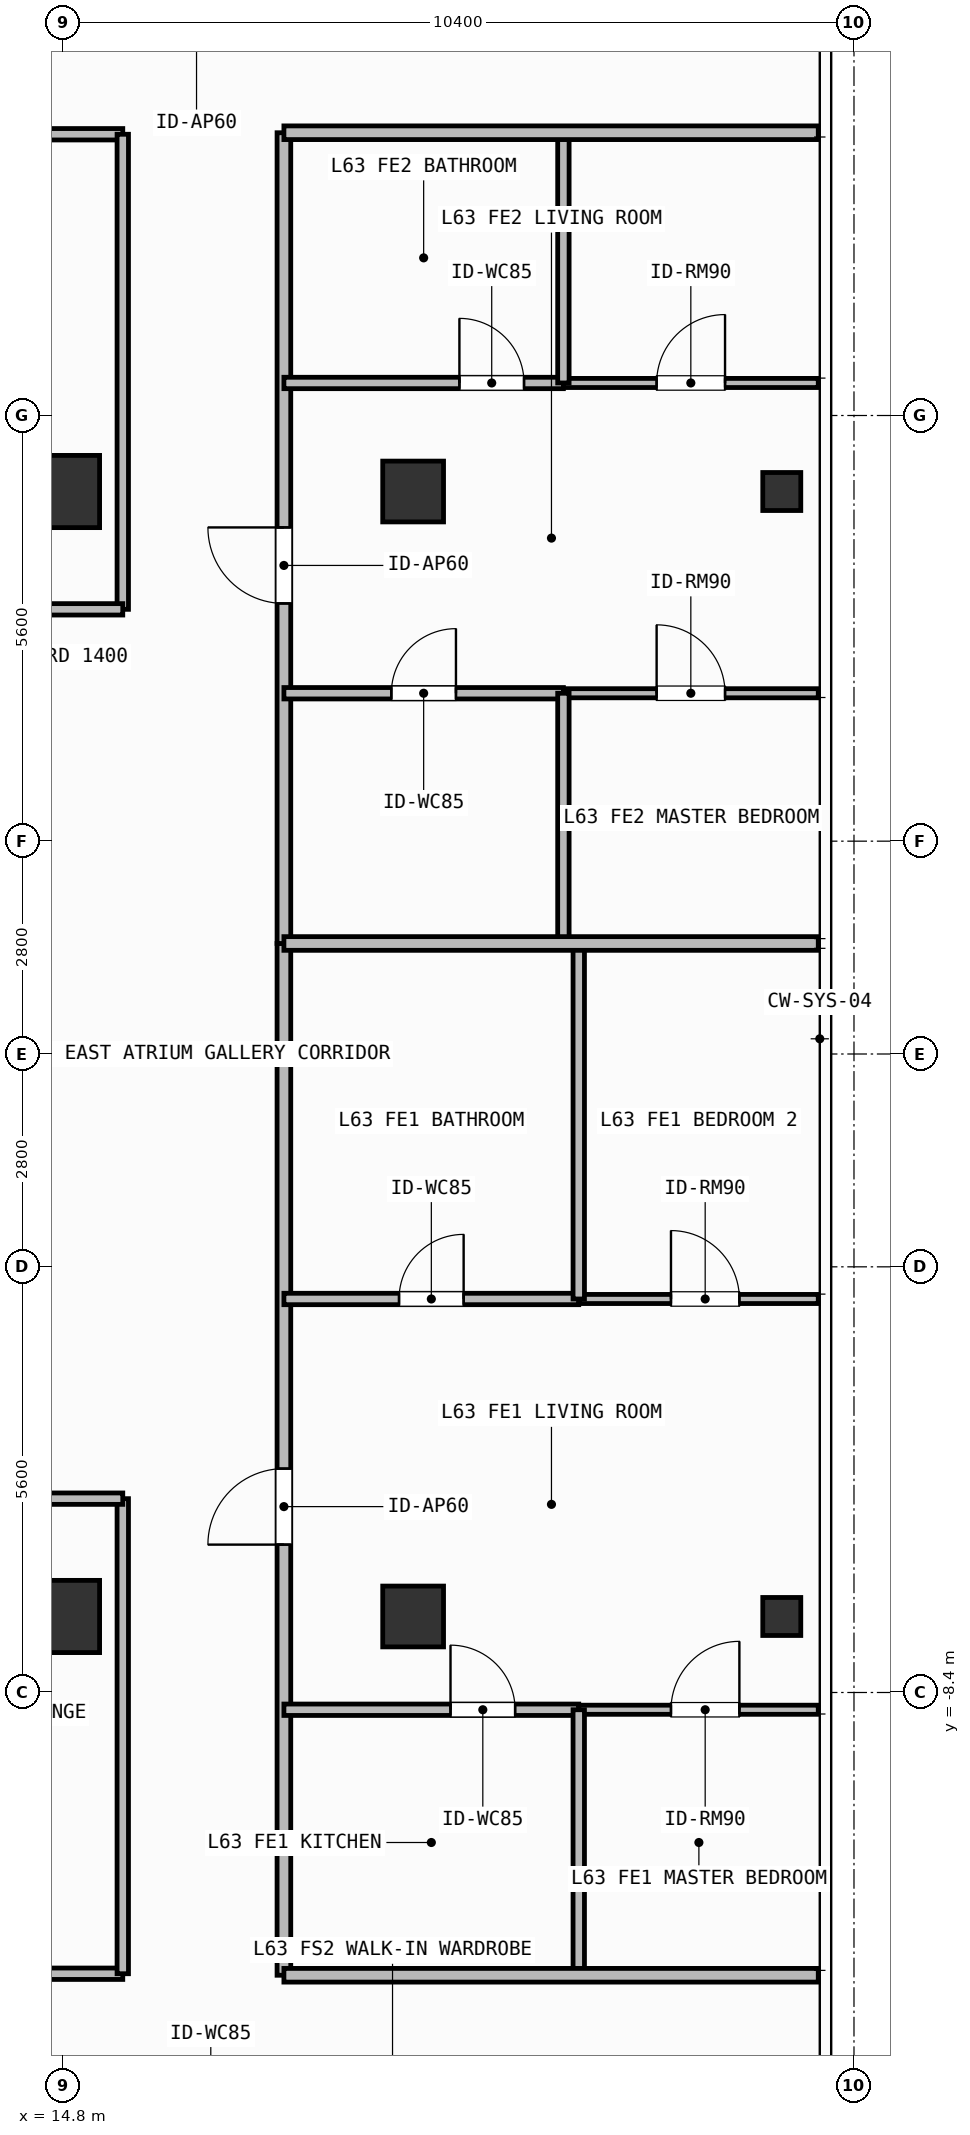
"""IFC4 building model, lengths in metres.
Left out: names, types, materials, properties, quantities, classifications, styles, units other than length and angle.
Written with IfcOpenShell. Run it as: python <this file> out.ifc"""

import sys

from ifc_helpers import new_model, si_unit, direction, frame, frame_2d, origin, origin_2d, place, context, subcontext, project, spatial, rectangle, hollow_rectangle, extrude, element, fill, save


model = new_model("IFC4")
c1 = context("Model", 3, precision=1e-05, world=origin(), true_north=direction((0.0, 1.0)))
c2 = subcontext(c1, "Body", "Model", "MODEL_VIEW")
j1 = project(units=[si_unit("LENGTHUNIT", "METRE"), si_unit("PLANEANGLEUNIT", "RADIAN")], contexts=[c1])
p1 = place(None, origin())
s1 = spatial("IfcSite", under=j1, at=p1, CompositionType="ELEMENT")
p2 = place(p1, origin())
s2 = spatial("IfcBuilding", under=s1, at=p2, CompositionType="ELEMENT")
p3 = place(p2, frame((0.0, 0.0, 258.6)))
s3 = spatial("IfcBuildingStorey", under=s2, at=p3, CompositionType="ELEMENT", Elevation=258.6)
for number, where, z_axis, x_axis in (
    (1, (14.8, -7.4, 0.0), (0.0, 0.0, 1.0), (1.0, 0.0, 0.0)),
    (2, (14.8, 7.4, 0.0), (0.0, 0.0, 1.0), (1.0, 0.0, 0.0)),
):
    element("IfcColumn", number, at=place(p3, frame(where, z_axis=z_axis, x_axis=x_axis)), inside=s3, PredefinedType="COLUMN", context=c2, shape_type="SweptSolid", body=[
        extrude(rectangle(XDim=0.95, YDim=0.95, at=origin_2d()), origin(), (0.0, 0.0, 1.0), 3.9),
    ])
for number, where, z_axis, x_axis in (
    (3, (19.4, -7.4, 0.0), (0.0, 0.0, 1.0), (1.0, 0.0, 0.0)),
    (4, (19.4, 7.4, 0.0), (0.0, 0.0, 1.0), (1.0, 0.0, 0.0)),
):
    element("IfcColumn", number, at=place(p3, frame(where, z_axis=z_axis, x_axis=x_axis)), inside=s3, PredefinedType="COLUMN", context=c2, shape_type="SweptSolid", body=[
        extrude(hollow_rectangle(XDim=0.8, YDim=0.8, WallThickness=0.036, at=origin_2d()), origin(), (0.0, 0.0, 1.0), 3.9),
    ])
for number, where, z_axis, x_axis in (
    (5, (24.25, -7.4, 0.0), (0.0, 0.0, 1.0), (1.0, 0.0, 0.0)),
    (6, (24.25, 7.4, 0.0), (0.0, 0.0, 1.0), (1.0, 0.0, 0.0)),
):
    element("IfcColumn", number, at=place(p3, frame(where, z_axis=z_axis, x_axis=x_axis)), inside=s3, PredefinedType="COLUMN", context=c2, shape_type="SweptSolid", body=[
        extrude(hollow_rectangle(XDim=0.5, YDim=0.5, WallThickness=0.025, at=origin_2d()), origin(), (0.0, 0.0, 1.0), 3.9),
    ])
p4 = place(p3, frame((10.1, -12.1, 0.0), z_axis=(0.0, 0.0, 1.0), x_axis=(1.0, 0.0, 0.0)))
e7 = element("IfcWall", 7, at=p4, inside=s3, PredefinedType="PARTITIONING", context=c2, shape_type="SweptSolid", body=[
    extrude(rectangle(XDim=5.48, YDim=0.15, at=frame_2d((2.74, 0.0))), origin(), (0.0, 0.0, 1.0), 3.68),
])
p5 = place(p4, frame((2.29, 0.0, 0.0)))
e8 = element("IfcOpeningElement", 8, at=p5, cuts=e7, PredefinedType="OPENING", context=c2, shape_type="SweptSolid", body=[
    extrude(rectangle(XDim=0.9, YDim=2.1, at=frame_2d((0.45, 1.05))), frame((0.0, 0.085, 0.0), z_axis=(0.0, -1.0, 0.0), x_axis=(1.0, 0.0, 0.0)), (0.0, 0.0, 1.0), 0.17),
])
p6 = place(p3, frame((8.36, 12.1, 0.0), z_axis=(0.0, 0.0, 1.0), x_axis=(1.0, 0.0, 0.0)))
e9 = element("IfcWall", 9, at=p6, inside=s3, PredefinedType="PARTITIONING", context=c2, shape_type="SweptSolid", body=[
    extrude(rectangle(XDim=7.22, YDim=0.15, at=frame_2d((3.61, 0.0))), origin(), (0.0, 0.0, 1.0), 3.68),
])
p7 = place(p6, frame((3.513, 0.0, 0.0)))
e10 = element("IfcOpeningElement", 10, at=p7, cuts=e9, PredefinedType="OPENING", context=c2, shape_type="SweptSolid", body=[
    extrude(rectangle(XDim=0.9, YDim=2.1, at=frame_2d((0.45, 1.05))), frame((0.0, 0.085, 0.0), z_axis=(0.0, -1.0, 0.0), x_axis=(1.0, 0.0, 0.0)), (0.0, 0.0, 1.0), 0.17),
])
p8 = place(p3, frame((17.7, -12.12, 0.0), z_axis=(0.0, 0.0, 1.0), x_axis=(0.0, 1.0, 0.0)))
e11 = element("IfcWall", 11, at=p8, inside=s3, PredefinedType="PARTITIONING", context=c2, shape_type="SweptSolid", body=[
    extrude(rectangle(XDim=13.574, YDim=0.18, at=frame_2d((6.787, 0.0))), origin(), (0.0, 0.0, 1.0), 3.68),
])
p9 = place(p8, frame((5.665, 0.0, 0.0)))
e12 = element("IfcOpeningElement", 12, at=p9, cuts=e11, PredefinedType="OPENING", context=c2, shape_type="SweptSolid", body=[
    extrude(rectangle(XDim=1.0, YDim=2.2, at=frame_2d((0.5, 1.1))), frame((0.0, 0.1, 0.0), z_axis=(0.0, -1.0, 0.0), x_axis=(1.0, 0.0, 0.0)), (0.0, 0.0, 1.0), 0.2),
])
p10 = place(p3, frame((17.7, -3.223, 0.0), z_axis=(0.0, 0.0, 1.0), x_axis=(1.0, 0.0, 0.0)))
e13 = element("IfcWall", 13, at=p10, inside=s3, PredefinedType="PARTITIONING", context=c2, shape_type="SweptSolid", body=[
    extrude(rectangle(XDim=3.879, YDim=0.15, at=frame_2d((1.939, 0.0))), origin(), (0.0, 0.0, 1.0), 3.68),
])
p11 = place(p10, frame((1.514, 0.0, 0.0)))
e14 = element("IfcOpeningElement", 14, at=p11, cuts=e13, PredefinedType="OPENING", context=c2, shape_type="SweptSolid", body=[
    extrude(rectangle(XDim=0.85, YDim=2.1, at=frame_2d((0.425, 1.05))), frame((0.0, 0.085, 0.0), z_axis=(0.0, -1.0, 0.0), x_axis=(1.0, 0.0, 0.0)), (0.0, 0.0, 1.0), 0.17),
])
p12 = place(p3, frame((17.7, -8.627, 0.0), z_axis=(0.0, 0.0, 1.0), x_axis=(1.0, 0.0, 0.0)))
e15 = element("IfcWall", 15, at=p12, inside=s3, PredefinedType="PARTITIONING", context=c2, shape_type="SweptSolid", body=[
    extrude(rectangle(XDim=3.879, YDim=0.15, at=frame_2d((1.939, 0.0))), origin(), (0.0, 0.0, 1.0), 3.68),
])
p13 = place(p12, frame((2.192, 0.0, 0.0)))
e16 = element("IfcOpeningElement", 16, at=p13, cuts=e15, PredefinedType="OPENING", context=c2, shape_type="SweptSolid", body=[
    extrude(rectangle(XDim=0.85, YDim=2.1, at=frame_2d((0.425, 1.05))), frame((0.0, 0.085, 0.0), z_axis=(0.0, -1.0, 0.0), x_axis=(1.0, 0.0, 0.0)), (0.0, 0.0, 1.0), 0.17),
])
p14 = place(p3, frame((21.579, -8.627, 0.0), z_axis=(0.0, 0.0, 1.0), x_axis=(1.0, 0.0, 0.0)))
e17 = element("IfcWall", 17, at=p14, inside=s3, PredefinedType="PARTITIONING", context=c2, shape_type="SweptSolid", body=[
    extrude(rectangle(XDim=3.151, YDim=0.12, at=frame_2d((1.575, 0.0))), origin(), (0.0, 0.0, 1.0), 3.68),
])
p15 = place(p14, frame((1.213, 0.0, 0.0)))
e18 = element("IfcOpeningElement", 18, at=p15, cuts=e17, PredefinedType="OPENING", context=c2, shape_type="SweptSolid", body=[
    extrude(rectangle(XDim=0.9, YDim=2.1, at=frame_2d((0.45, 1.05))), frame((0.0, 0.07, 0.0), z_axis=(0.0, -1.0, 0.0), x_axis=(1.0, 0.0, 0.0)), (0.0, 0.0, 1.0), 0.14),
])
p16 = place(p3, frame((21.579, -3.223, 0.0), z_axis=(0.0, 0.0, 1.0), x_axis=(1.0, 0.0, 0.0)))
e19 = element("IfcWall", 19, at=p16, inside=s3, PredefinedType="PARTITIONING", context=c2, shape_type="SweptSolid", body=[
    extrude(rectangle(XDim=3.151, YDim=0.12, at=frame_2d((1.575, 0.0))), origin(), (0.0, 0.0, 1.0), 3.68),
])
p17 = place(p16, frame((1.213, 0.0, 0.0)))
e20 = element("IfcOpeningElement", 20, at=p17, cuts=e19, PredefinedType="OPENING", context=c2, shape_type="SweptSolid", body=[
    extrude(rectangle(XDim=0.9, YDim=2.1, at=frame_2d((0.45, 1.05))), frame((0.0, 0.07, 0.0), z_axis=(0.0, -1.0, 0.0), x_axis=(1.0, 0.0, 0.0)), (0.0, 0.0, 1.0), 0.14),
])
p18 = place(p3, frame((17.7, 1.454, 0.0), z_axis=(0.0, 0.0, 1.0), x_axis=(0.0, 1.0, 0.0)))
e21 = element("IfcWall", 21, at=p18, inside=s3, PredefinedType="PARTITIONING", context=c2, shape_type="SweptSolid", body=[
    extrude(rectangle(XDim=10.666, YDim=0.18, at=frame_2d((5.333, 0.0))), origin(), (0.0, 0.0, 1.0), 3.68),
])
p19 = place(p18, frame((4.473, 0.0, 0.0)))
e22 = element("IfcOpeningElement", 22, at=p19, cuts=e21, PredefinedType="OPENING", context=c2, shape_type="SweptSolid", body=[
    extrude(rectangle(XDim=1.0, YDim=2.2, at=frame_2d((0.5, 1.1))), frame((0.0, 0.1, 0.0), z_axis=(0.0, -1.0, 0.0), x_axis=(1.0, 0.0, 0.0)), (0.0, 0.0, 1.0), 0.2),
])
p20 = place(p3, frame((17.7, 8.828, 0.0), z_axis=(0.0, 0.0, 1.0), x_axis=(1.0, 0.0, 0.0)))
e23 = element("IfcWall", 23, at=p20, inside=s3, PredefinedType="PARTITIONING", context=c2, shape_type="SweptSolid", body=[
    extrude(rectangle(XDim=3.677, YDim=0.15, at=frame_2d((1.838, 0.0))), origin(), (0.0, 0.0, 1.0), 3.68),
])
p21 = place(p20, frame((2.309, 0.0, 0.0)))
e24 = element("IfcOpeningElement", 24, at=p21, cuts=e23, PredefinedType="OPENING", context=c2, shape_type="SweptSolid", body=[
    extrude(rectangle(XDim=0.85, YDim=2.1, at=frame_2d((0.425, 1.05))), frame((0.0, 0.085, 0.0), z_axis=(0.0, -1.0, 0.0), x_axis=(1.0, 0.0, 0.0)), (0.0, 0.0, 1.0), 0.17),
])
p22 = place(p3, frame((17.7, 4.746, 0.0), z_axis=(0.0, 0.0, 1.0), x_axis=(1.0, 0.0, 0.0)))
e25 = element("IfcWall", 25, at=p22, inside=s3, PredefinedType="PARTITIONING", context=c2, shape_type="SweptSolid", body=[
    extrude(rectangle(XDim=3.677, YDim=0.15, at=frame_2d((1.838, 0.0))), origin(), (0.0, 0.0, 1.0), 3.68),
])
p23 = place(p22, frame((1.414, 0.0, 0.0)))
e26 = element("IfcOpeningElement", 26, at=p23, cuts=e25, PredefinedType="OPENING", context=c2, shape_type="SweptSolid", body=[
    extrude(rectangle(XDim=0.85, YDim=2.1, at=frame_2d((0.425, 1.05))), frame((0.0, 0.085, 0.0), z_axis=(0.0, -1.0, 0.0), x_axis=(1.0, 0.0, 0.0)), (0.0, 0.0, 1.0), 0.17),
])
p24 = place(p3, frame((21.377, 4.746, 0.0), z_axis=(0.0, 0.0, 1.0), x_axis=(1.0, 0.0, 0.0)))
e27 = element("IfcWall", 27, at=p24, inside=s3, PredefinedType="PARTITIONING", context=c2, shape_type="SweptSolid", body=[
    extrude(rectangle(XDim=3.353, YDim=0.12, at=frame_2d((1.677, 0.0))), origin(), (0.0, 0.0, 1.0), 3.68),
])
p25 = place(p24, frame((1.227, 0.0, 0.0)))
e28 = element("IfcOpeningElement", 28, at=p25, cuts=e27, PredefinedType="OPENING", context=c2, shape_type="SweptSolid", body=[
    extrude(rectangle(XDim=0.9, YDim=2.1, at=frame_2d((0.45, 1.05))), frame((0.0, 0.07, 0.0), z_axis=(0.0, -1.0, 0.0), x_axis=(1.0, 0.0, 0.0)), (0.0, 0.0, 1.0), 0.14),
])
p26 = place(p3, frame((21.377, 8.828, 0.0), z_axis=(0.0, 0.0, 1.0), x_axis=(1.0, 0.0, 0.0)))
e29 = element("IfcWall", 29, at=p26, inside=s3, PredefinedType="PARTITIONING", context=c2, shape_type="SweptSolid", body=[
    extrude(rectangle(XDim=3.353, YDim=0.12, at=frame_2d((1.677, 0.0))), origin(), (0.0, 0.0, 1.0), 3.68),
])
p27 = place(p26, frame((1.227, 0.0, 0.0)))
e30 = element("IfcOpeningElement", 30, at=p27, cuts=e29, PredefinedType="OPENING", context=c2, shape_type="SweptSolid", body=[
    extrude(rectangle(XDim=0.9, YDim=2.1, at=frame_2d((0.45, 1.05))), frame((0.0, 0.07, 0.0), z_axis=(0.0, -1.0, 0.0), x_axis=(1.0, 0.0, 0.0)), (0.0, 0.0, 1.0), 0.14),
])
p28 = place(p3, frame((15.58, -12.1, 0.0), z_axis=(0.0, 0.0, 1.0), x_axis=(0.0, 1.0, 0.0)))
e31 = element("IfcWall", 31, at=p28, inside=s3, PredefinedType="PARTITIONING", context=c2, shape_type="SweptSolid", body=[
    extrude(rectangle(XDim=6.25, YDim=0.15, at=frame_2d((3.125, 0.0))), origin(), (0.0, 0.0, 1.0), 3.68),
])
p29 = place(p3, frame((8.96, -5.85, 0.0), z_axis=(0.0, 0.0, 1.0), x_axis=(1.0, 0.0, 0.0)))
e32 = element("IfcWall", 32, at=p29, inside=s3, PredefinedType="PARTITIONING", context=c2, shape_type="SweptSolid", body=[
    extrude(rectangle(XDim=6.62, YDim=0.15, at=frame_2d((3.31, 0.0))), origin(), (0.0, 0.0, 1.0), 3.68),
])
p30 = place(p3, frame((15.58, 5.85, 0.0), z_axis=(0.0, 0.0, 1.0), x_axis=(0.0, 1.0, 0.0)))
e33 = element("IfcWall", 33, at=p30, inside=s3, PredefinedType="PARTITIONING", context=c2, shape_type="SweptSolid", body=[
    extrude(rectangle(XDim=6.25, YDim=0.15, at=frame_2d((3.125, 0.0))), origin(), (0.0, 0.0, 1.0), 3.68),
])
p31 = place(p3, frame((8.96, 5.85, 0.0), z_axis=(0.0, 0.0, 1.0), x_axis=(1.0, 0.0, 0.0)))
e34 = element("IfcWall", 34, at=p31, inside=s3, PredefinedType="PARTITIONING", context=c2, shape_type="SweptSolid", body=[
    extrude(rectangle(XDim=6.62, YDim=0.15, at=frame_2d((3.31, 0.0))), origin(), (0.0, 0.0, 1.0), 3.68),
])
p32 = place(p3, frame((21.579, -12.12, 0.0), z_axis=(0.0, 0.0, 1.0), x_axis=(0.0, 1.0, 0.0)))
e35 = element("IfcWall", 35, at=p32, inside=s3, PredefinedType="PARTITIONING", context=c2, shape_type="SweptSolid", body=[
    extrude(rectangle(XDim=3.493, YDim=0.15, at=frame_2d((1.747, 0.0))), origin(), (0.0, 0.0, 1.0), 3.68),
])
p33 = place(p3, frame((21.579, -3.223, 0.0), z_axis=(0.0, 0.0, 1.0), x_axis=(0.0, 1.0, 0.0)))
e36 = element("IfcWall", 36, at=p33, inside=s3, PredefinedType="PARTITIONING", context=c2, shape_type="SweptSolid", body=[
    extrude(rectangle(XDim=4.677, YDim=0.15, at=frame_2d((2.338, 0.0))), origin(), (0.0, 0.0, 1.0), 3.68),
])
p34 = place(p3, frame((21.377, 1.454, 0.0), z_axis=(0.0, 0.0, 1.0), x_axis=(0.0, 1.0, 0.0)))
e37 = element("IfcWall", 37, at=p34, inside=s3, PredefinedType="PARTITIONING", context=c2, shape_type="SweptSolid", body=[
    extrude(rectangle(XDim=3.292, YDim=0.15, at=frame_2d((1.646, 0.0))), origin(), (0.0, 0.0, 1.0), 3.68),
])
p35 = place(p3, frame((21.377, 8.828, 0.0), z_axis=(0.0, 0.0, 1.0), x_axis=(0.0, 1.0, 0.0)))
e38 = element("IfcWall", 38, at=p35, inside=s3, PredefinedType="PARTITIONING", context=c2, shape_type="SweptSolid", body=[
    extrude(rectangle(XDim=3.292, YDim=0.15, at=frame_2d((1.646, 0.0))), origin(), (0.0, 0.0, 1.0), 3.68),
])
for number, where, z_axis, x_axis in (
    (39, (17.7, 1.454, 0.0), (0.0, 0.0, 1.0), (1.0, 0.0, 0.0)),
    (40, (17.7, -12.12, 0.0), (0.0, 0.0, 1.0), (1.0, 0.0, 0.0)),
    (41, (17.7, 12.12, 0.0), (0.0, 0.0, 1.0), (1.0, 0.0, 0.0)),
):
    element("IfcWall", number, at=place(p3, frame(where, z_axis=z_axis, x_axis=x_axis)), inside=s3, PredefinedType="PARTITIONING", context=c2, shape_type="SweptSolid", body=[
        extrude(rectangle(XDim=7.03, YDim=0.18, at=frame_2d((3.515, 0.0))), origin(), (0.0, 0.0, 1.0), 3.68),
    ])
p36 = place(p9, origin())
e42 = element("IfcDoor", 42, at=p36, inside=s3, OperationType="SINGLE_SWING_LEFT", PredefinedType="DOOR", context=c2, shape_type="SweptSolid", body=[
    extrude(rectangle(XDim=1.0, YDim=2.2, at=frame_2d((0.5, 1.1))), frame((0.0, 0.025, 0.0), z_axis=(0.0, -1.0, 0.0), x_axis=(1.0, 0.0, 0.0)), (0.0, 0.0, 1.0), 0.05),
])
fill(e12, e42)
p37 = place(p11, origin())
e43 = element("IfcDoor", 43, at=p37, inside=s3, OperationType="SINGLE_SWING_RIGHT", PredefinedType="DOOR", context=c2, shape_type="SweptSolid", body=[
    extrude(rectangle(XDim=0.85, YDim=2.1, at=frame_2d((0.425, 1.05))), frame((0.0, 0.025, 0.0), z_axis=(0.0, -1.0, 0.0), x_axis=(1.0, 0.0, 0.0)), (0.0, 0.0, 1.0), 0.05),
])
fill(e14, e43)
p38 = place(p13, origin())
e44 = element("IfcDoor", 44, at=p38, inside=s3, OperationType="SINGLE_SWING_LEFT", PredefinedType="DOOR", context=c2, shape_type="SweptSolid", body=[
    extrude(rectangle(XDim=0.85, YDim=2.1, at=frame_2d((0.425, 1.05))), frame((0.0, 0.025, 0.0), z_axis=(0.0, -1.0, 0.0), x_axis=(1.0, 0.0, 0.0)), (0.0, 0.0, 1.0), 0.05),
])
fill(e16, e44)
p39 = place(p15, origin())
e45 = element("IfcDoor", 45, at=p39, inside=s3, OperationType="SINGLE_SWING_RIGHT", PredefinedType="DOOR", context=c2, shape_type="SweptSolid", body=[
    extrude(rectangle(XDim=0.9, YDim=2.1, at=frame_2d((0.45, 1.05))), frame((0.0, 0.025, 0.0), z_axis=(0.0, -1.0, 0.0), x_axis=(1.0, 0.0, 0.0)), (0.0, 0.0, 1.0), 0.05),
])
fill(e18, e45)
p40 = place(p17, origin())
e46 = element("IfcDoor", 46, at=p40, inside=s3, OperationType="SINGLE_SWING_LEFT", PredefinedType="DOOR", context=c2, shape_type="SweptSolid", body=[
    extrude(rectangle(XDim=0.9, YDim=2.1, at=frame_2d((0.45, 1.05))), frame((0.0, 0.025, 0.0), z_axis=(0.0, -1.0, 0.0), x_axis=(1.0, 0.0, 0.0)), (0.0, 0.0, 1.0), 0.05),
])
fill(e20, e46)
p41 = place(p19, origin())
e47 = element("IfcDoor", 47, at=p41, inside=s3, OperationType="SINGLE_SWING_RIGHT", PredefinedType="DOOR", context=c2, shape_type="SweptSolid", body=[
    extrude(rectangle(XDim=1.0, YDim=2.2, at=frame_2d((0.5, 1.1))), frame((0.0, 0.025, 0.0), z_axis=(0.0, -1.0, 0.0), x_axis=(1.0, 0.0, 0.0)), (0.0, 0.0, 1.0), 0.05),
])
fill(e22, e47)
p42 = place(p21, origin())
e48 = element("IfcDoor", 48, at=p42, inside=s3, OperationType="SINGLE_SWING_LEFT", PredefinedType="DOOR", context=c2, shape_type="SweptSolid", body=[
    extrude(rectangle(XDim=0.85, YDim=2.1, at=frame_2d((0.425, 1.05))), frame((0.0, 0.025, 0.0), z_axis=(0.0, -1.0, 0.0), x_axis=(1.0, 0.0, 0.0)), (0.0, 0.0, 1.0), 0.05),
])
fill(e24, e48)
p43 = place(p23, origin())
e49 = element("IfcDoor", 49, at=p43, inside=s3, OperationType="SINGLE_SWING_RIGHT", PredefinedType="DOOR", context=c2, shape_type="SweptSolid", body=[
    extrude(rectangle(XDim=0.85, YDim=2.1, at=frame_2d((0.425, 1.05))), frame((0.0, 0.025, 0.0), z_axis=(0.0, -1.0, 0.0), x_axis=(1.0, 0.0, 0.0)), (0.0, 0.0, 1.0), 0.05),
])
fill(e26, e49)
p44 = place(p25, origin())
e50 = element("IfcDoor", 50, at=p44, inside=s3, OperationType="SINGLE_SWING_LEFT", PredefinedType="DOOR", context=c2, shape_type="SweptSolid", body=[
    extrude(rectangle(XDim=0.9, YDim=2.1, at=frame_2d((0.45, 1.05))), frame((0.0, 0.025, 0.0), z_axis=(0.0, -1.0, 0.0), x_axis=(1.0, 0.0, 0.0)), (0.0, 0.0, 1.0), 0.05),
])
fill(e28, e50)
p45 = place(p27, origin())
e51 = element("IfcDoor", 51, at=p45, inside=s3, OperationType="SINGLE_SWING_RIGHT", PredefinedType="DOOR", context=c2, shape_type="SweptSolid", body=[
    extrude(rectangle(XDim=0.9, YDim=2.1, at=frame_2d((0.45, 1.05))), frame((0.0, 0.025, 0.0), z_axis=(0.0, -1.0, 0.0), x_axis=(1.0, 0.0, 0.0)), (0.0, 0.0, 1.0), 0.05),
])
fill(e30, e51)
save(model, sys.argv[1])
